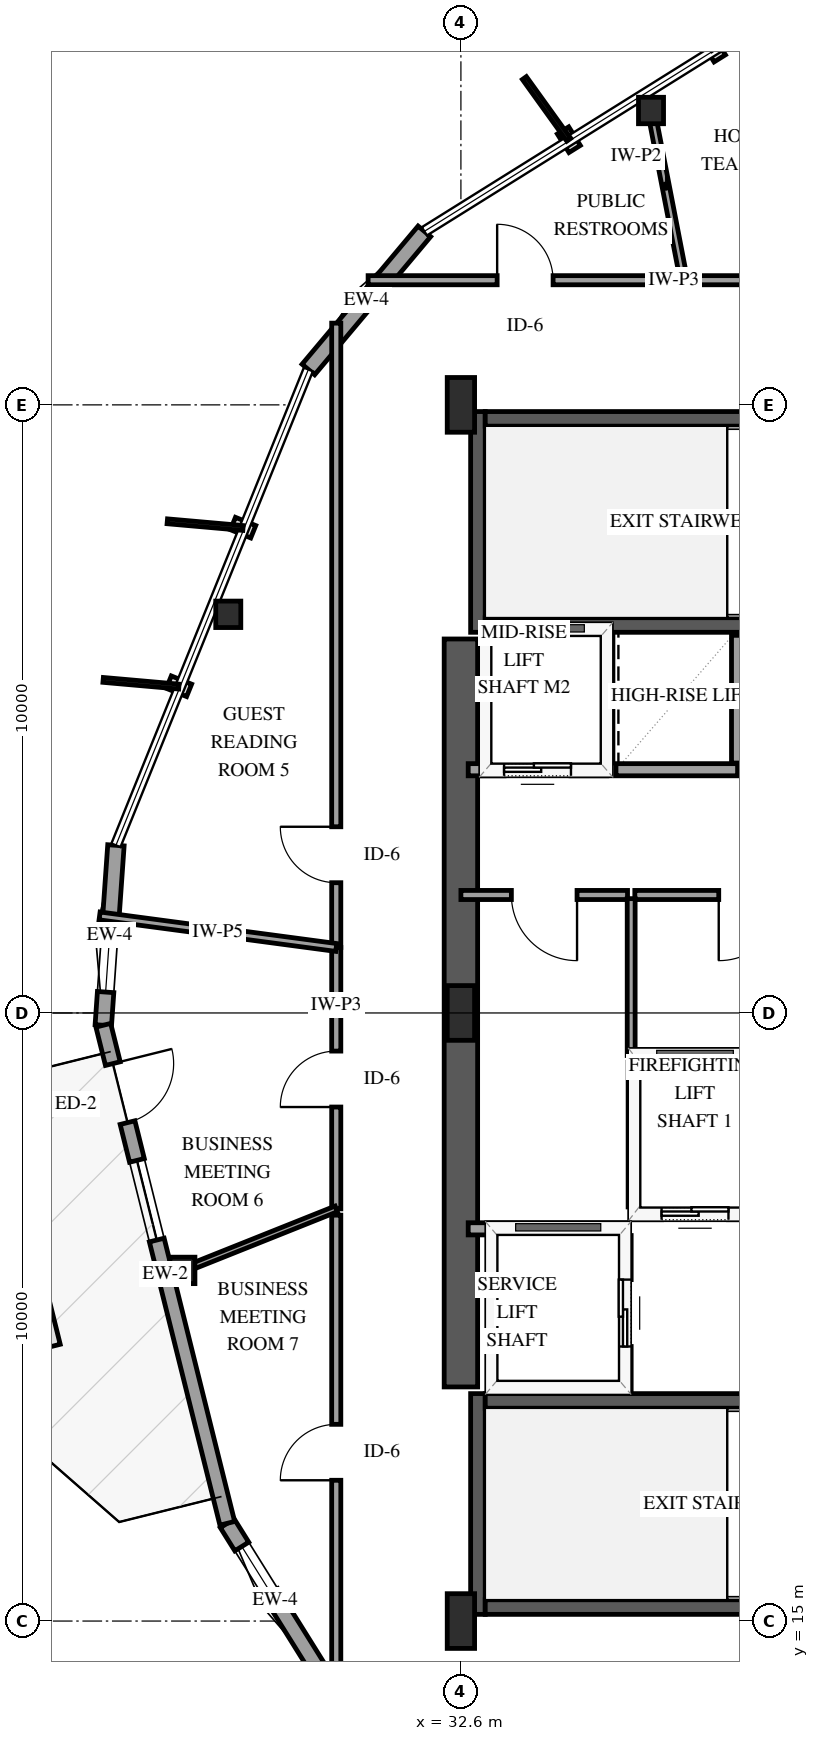
"""IFC4 building model, lengths in metres.
Left out: names, types, materials, properties, quantities, classifications, styles, units other than length and angle.
Written with IfcOpenShell. Run it as: python <this file> out.ifc"""

import sys

from ifc_helpers import new_model, si_unit, direction, frame, frame_2d, origin, origin_2d, place, context, subcontext, project, spatial, rectangle, i_section, extrude, element, fill, save


model = new_model("IFC4")
c1 = context("Model", 3, precision=1e-05, world=origin(), true_north=direction((0.0, 1.0)))
c2 = subcontext(c1, "Body", "Model", "MODEL_VIEW")
j1 = project(units=[si_unit("LENGTHUNIT", "METRE"), si_unit("PLANEANGLEUNIT", "RADIAN")], contexts=[c1])
p1 = place(None, origin())
s1 = spatial("IfcSite", under=j1, at=p1, CompositionType="ELEMENT")
p2 = place(p1, origin())
s2 = spatial("IfcBuilding", under=s1, at=p2, CompositionType="ELEMENT")
p3 = place(p2, frame((0.0, 0.0, 157.0)))
s3 = spatial("IfcBuildingStorey", under=s2, at=p3, CompositionType="ELEMENT", Elevation=157.0)
p4 = place(p3, frame((32.88, 15.11, 0.0), z_axis=(0.0, 0.0, 1.0), x_axis=(0.0, 1.0, 0.0)))
e1 = element("IfcWall", 1, at=p4, inside=s3, PredefinedType="SHEAR", context=c2, shape_type="SweptSolid", body=[
    extrude(rectangle(XDim=3.63, YDim=0.24, at=frame_2d((1.815, 0.0))), origin(), (0.0, 0.0, 1.0), 3.6),
])
for number, where, z_axis, x_axis in (
    (2, (33.0, 15.23, 0.0), (0.0, 0.0, 1.0), (1.0, 0.0, 0.0)),
    (3, (33.0, 18.62, 0.0), (0.0, 0.0, 1.0), (1.0, 0.0, 0.0)),
):
    element("IfcWall", number, at=place(p3, frame(where, z_axis=z_axis, x_axis=x_axis)), inside=s3, PredefinedType="SHEAR", context=c2, shape_type="SweptSolid", body=[
        extrude(rectangle(XDim=8.0, YDim=0.24, at=frame_2d((4.0, 0.0))), origin(), (0.0, 0.0, 1.0), 3.6),
    ])
p5 = place(p3, frame((32.88, 31.26, 0.0), z_axis=(0.0, 0.0, 1.0), x_axis=(0.0, 1.0, 0.0)))
e4 = element("IfcWall", 4, at=p5, inside=s3, PredefinedType="SHEAR", context=c2, shape_type="SweptSolid", body=[
    extrude(rectangle(XDim=3.63, YDim=0.24, at=frame_2d((1.815, 0.0))), origin(), (0.0, 0.0, 1.0), 3.6),
])
for number, where, z_axis, x_axis in (
    (5, (33.0, 31.38, 0.0), (0.0, 0.0, 1.0), (1.0, 0.0, 0.0)),
    (6, (33.0, 34.77, 0.0), (0.0, 0.0, 1.0), (1.0, 0.0, 0.0)),
):
    element("IfcWall", number, at=place(p3, frame(where, z_axis=z_axis, x_axis=x_axis)), inside=s3, PredefinedType="SHEAR", context=c2, shape_type="SweptSolid", body=[
        extrude(rectangle(XDim=8.0, YDim=0.24, at=frame_2d((4.0, 0.0))), origin(), (0.0, 0.0, 1.0), 3.6),
    ])
p6 = place(p3, frame((32.6, 18.85, 0.0), z_axis=(0.0, 0.0, 1.0), x_axis=(0.0, 1.0, 0.0)))
e7 = element("IfcWall", 7, at=p6, inside=s3, PredefinedType="SHEAR", context=c2, shape_type="SweptSolid", body=[
    extrude(rectangle(XDim=12.3, YDim=0.55, at=frame_2d((6.15, 0.0))), origin(), (0.0, 0.0, 1.0), 3.6),
])
for number, where, z_axis, x_axis in (
    (8, (32.6, 15.0, 0.0), (0.0, 0.0, 1.0), (1.0, 0.0, 0.0)),
    (9, (32.6, 25.0, 0.0), (0.0, 0.0, 1.0), (1.0, 0.0, 0.0)),
    (10, (32.6, 35.0, 0.0), (0.0, 0.0, 1.0), (1.0, 0.0, 0.0)),
):
    element("IfcColumn", number, at=place(p3, frame(where, z_axis=z_axis, x_axis=x_axis)), inside=s3, PredefinedType="PILASTER", context=c2, shape_type="SweptSolid", body=[
        extrude(rectangle(XDim=0.45, YDim=0.9, at=origin_2d()), origin(), (0.0, 0.0, 1.0), 3.6),
    ])
for number, where, z_axis, x_axis in (
    (11, (35.726, 39.841, 0.0), (0.0, 0.0, 1.0), (1.0, 0.0, 0.0)),
    (12, (28.774, 31.556, 0.0), (0.0, 0.0, 1.0), (1.0, 0.0, 0.0)),
    (13, (28.02, 20.766, 0.0), (0.0, 0.0, 1.0), (1.0, 0.0, 0.0)),
):
    element("IfcColumn", number, at=place(p3, frame(where, z_axis=z_axis, x_axis=x_axis)), inside=s3, PredefinedType="COLUMN", context=c2, shape_type="SweptSolid", body=[
        extrude(i_section(OverallWidth=0.412, OverallDepth=0.435, WebThickness=0.036, FlangeThickness=0.057, FilletRadius=0.038, at=origin_2d()), origin(), (0.0, 0.0, 1.0), 3.6),
    ])
p7 = place(p3, frame((31.999, 37.854, 0.0), z_axis=(0.0, 0.0, 1.0), x_axis=(-0.643085925087, -0.765794027762, 0.0)))
e14 = element("IfcWall", 14, at=p7, inside=s3, PredefinedType="SOLIDWALL", context=c2, shape_type="SweptSolid", body=[
    extrude(rectangle(XDim=2.967, YDim=0.27, at=frame_2d((1.483, 0.0))), origin(), (0.0, 0.0, 1.0), 2.679),
])
p8 = place(p3, frame((26.927, 27.757, 0.0), z_axis=(0.0, 0.0, 1.0), x_axis=(-0.070118221482, -0.997538688481, 0.0)))
e15 = element("IfcWall", 15, at=p8, inside=s3, PredefinedType="SOLIDWALL", context=c2, shape_type="SweptSolid", body=[
    extrude(rectangle(XDim=2.967, YDim=0.27, at=frame_2d((1.483, 0.0))), origin(), (0.0, 0.0, 1.0), 2.679),
])
p9 = place(p8, frame((1.519, 0.0, 0.75)))
e16 = element("IfcOpeningElement", 16, at=p9, cuts=e15, PredefinedType="OPENING", context=c2, shape_type="SweptSolid", body=[
    extrude(rectangle(XDim=0.9, YDim=1.5, at=frame_2d((0.45, 0.75))), frame((0.0, 0.145, 0.0), z_axis=(0.0, -1.0, 0.0), x_axis=(1.0, 0.0, 0.0)), (0.0, 0.0, 1.0), 0.29),
])
p10 = place(p3, frame((28.758, 16.607, 0.0), z_axis=(0.0, 0.0, 1.0), x_axis=(0.529592009117, -0.848252500073, 0.0)))
e17 = element("IfcWall", 17, at=p10, inside=s3, PredefinedType="SOLIDWALL", context=c2, shape_type="SweptSolid", body=[
    extrude(rectangle(XDim=2.967, YDim=0.27, at=frame_2d((1.483, 0.0))), origin(), (0.0, 0.0, 1.0), 2.679),
])
p11 = place(p10, frame((0.45, 0.0, 0.75)))
e18 = element("IfcOpeningElement", 18, at=p11, cuts=e17, PredefinedType="OPENING", context=c2, shape_type="SweptSolid", body=[
    extrude(rectangle(XDim=0.9, YDim=1.5, at=frame_2d((0.45, 0.75))), frame((0.0, 0.145, 0.0), z_axis=(0.0, -1.0, 0.0), x_axis=(1.0, 0.0, 0.0)), (0.0, 0.0, 1.0), 0.29),
])
p12 = place(p3, frame((26.719, 24.798, 0.0), z_axis=(0.0, 0.0, 1.0), x_axis=(0.241582680268, -0.970380239182, 0.0)))
e19 = element("IfcWall", 19, at=p12, inside=s3, PredefinedType="SOLIDWALL", context=c2, shape_type="SweptSolid", body=[
    extrude(rectangle(XDim=8.44, YDim=0.25, at=frame_2d((4.22, 0.0))), origin(), (0.0, 0.0, 1.0), 2.679),
])
p13 = place(p12, frame((0.65, 0.0, 0.0)))
e20 = element("IfcOpeningElement", 20, at=p13, cuts=e19, PredefinedType="OPENING", context=c2, shape_type="SweptSolid", body=[
    extrude(rectangle(XDim=1.0, YDim=2.15, at=frame_2d((0.5, 1.075))), frame((0.0, 0.135, 0.0), z_axis=(0.0, -1.0, 0.0), x_axis=(1.0, 0.0, 0.0)), (0.0, 0.0, 1.0), 0.27),
])
p14 = place(p12, frame((2.29, 0.0, 0.72)))
e21 = element("IfcOpeningElement", 21, at=p14, cuts=e19, PredefinedType="OPENING", context=c2, shape_type="SweptSolid", body=[
    extrude(rectangle(XDim=1.35, YDim=1.65, at=frame_2d((0.675, 0.825))), frame((0.0, 0.135, 0.0), z_axis=(0.0, -1.0, 0.0), x_axis=(1.0, 0.0, 0.0)), (0.0, 0.0, 1.0), 0.27),
])
p15 = place(p3, frame((35.45, 21.7, 0.0), z_axis=(0.0, 0.0, 1.0), x_axis=(1.0, 0.0, 0.0)))
e22 = element("IfcWall", 22, at=p15, inside=s3, PredefinedType="SOLIDWALL", context=c2, shape_type="SweptSolid", body=[
    extrude(rectangle(XDim=2.0, YDim=0.2, at=frame_2d((1.0, 0.0))), origin(), (0.0, 0.0, 1.0), 3.3),
])
p16 = place(p15, frame((0.45, 0.0, 0.0)))
e23 = element("IfcOpeningElement", 23, at=p16, cuts=e22, PredefinedType="OPENING", context=c2, shape_type="SweptSolid", body=[
    extrude(rectangle(XDim=1.1, YDim=2.15, at=frame_2d((0.55, 1.075))), frame((0.0, 0.11, 0.0), z_axis=(0.0, -1.0, 0.0), x_axis=(1.0, 0.0, 0.0)), (0.0, 0.0, 1.0), 0.22),
])
p17 = place(p3, frame((35.45, 24.3, 0.0), z_axis=(0.0, 0.0, 1.0), x_axis=(1.0, 0.0, 0.0)))
e24 = element("IfcWall", 24, at=p17, inside=s3, PredefinedType="SOLIDWALL", context=c2, shape_type="SweptSolid", body=[
    extrude(rectangle(XDim=2.0, YDim=0.2, at=frame_2d((1.0, 0.0))), origin(), (0.0, 0.0, 1.0), 3.3),
])
p18 = place(p3, frame((35.45, 21.81, 0.0), z_axis=(0.0, 0.0, 1.0), x_axis=(0.0, 1.0, 0.0)))
e25 = element("IfcWall", 25, at=p18, inside=s3, PredefinedType="SOLIDWALL", context=c2, shape_type="SweptSolid", body=[
    extrude(rectangle(XDim=2.38, YDim=0.2, at=frame_2d((1.19, 0.0))), origin(), (0.0, 0.0, 1.0), 3.3),
])
p19 = place(p3, frame((32.72, 21.45, 0.0), z_axis=(0.0, 0.0, 1.0), x_axis=(1.0, 0.0, 0.0)))
e26 = element("IfcWall", 26, at=p19, inside=s3, PredefinedType="SOLIDWALL", context=c2, shape_type="SweptSolid", body=[
    extrude(rectangle(XDim=2.58, YDim=0.2, at=frame_2d((1.29, 0.0))), origin(), (0.0, 0.0, 1.0), 3.3),
])
p20 = place(p3, frame((35.3, 18.79, 0.0), z_axis=(0.0, 0.0, 1.0), x_axis=(0.0, 1.0, 0.0)))
e27 = element("IfcWall", 27, at=p20, inside=s3, PredefinedType="SOLIDWALL", context=c2, shape_type="SweptSolid", body=[
    extrude(rectangle(XDim=2.55, YDim=0.2, at=frame_2d((1.275, 0.0))), origin(), (0.0, 0.0, 1.0), 3.3),
])
p21 = place(p20, frame((0.725, 0.0, 0.0)))
e28 = element("IfcOpeningElement", 28, at=p21, cuts=e27, PredefinedType="OPENING", context=c2, shape_type="SweptSolid", body=[
    extrude(rectangle(XDim=1.1, YDim=2.15, at=frame_2d((0.55, 1.075))), frame((0.0, 0.11, 0.0), z_axis=(0.0, -1.0, 0.0), x_axis=(1.0, 0.0, 0.0)), (0.0, 0.0, 1.0), 0.22),
])
p22 = place(p3, frame((32.72, 29.0, 0.0), z_axis=(0.0, 0.0, 1.0), x_axis=(1.0, 0.0, 0.0)))
e29 = element("IfcWall", 29, at=p22, inside=s3, PredefinedType="SOLIDWALL", context=c2, shape_type="SweptSolid", body=[
    extrude(rectangle(XDim=2.28, YDim=0.2, at=frame_2d((1.14, 0.0))), origin(), (0.0, 0.0, 1.0), 3.3),
])
p23 = place(p22, frame((0.59, 0.0, 0.0)))
e30 = element("IfcOpeningElement", 30, at=p23, cuts=e29, PredefinedType="OPENING", context=c2, shape_type="SweptSolid", body=[
    extrude(rectangle(XDim=1.1, YDim=2.15, at=frame_2d((0.55, 1.075))), frame((0.0, 0.11, 0.0), z_axis=(0.0, -1.0, 0.0), x_axis=(1.0, 0.0, 0.0)), (0.0, 0.0, 1.0), 0.22),
])
p24 = place(p3, frame((35.0, 29.11, 0.0), z_axis=(0.0, 0.0, 1.0), x_axis=(0.0, 1.0, 0.0)))
e31 = element("IfcWall", 31, at=p24, inside=s3, PredefinedType="SOLIDWALL", context=c2, shape_type="SweptSolid", body=[
    extrude(rectangle(XDim=2.1, YDim=0.2, at=frame_2d((1.05, 0.0))), origin(), (0.0, 0.0, 1.0), 3.3),
])
p25 = place(p3, frame((35.15, 29.0, 0.0), z_axis=(0.0, 0.0, 1.0), x_axis=(1.0, 0.0, 0.0)))
e32 = element("IfcWall", 32, at=p25, inside=s3, PredefinedType="SOLIDWALL", context=c2, shape_type="SweptSolid", body=[
    extrude(rectangle(XDim=2.0, YDim=0.2, at=frame_2d((1.0, 0.0))), origin(), (0.0, 0.0, 1.0), 3.3),
])
p26 = place(p3, frame((37.15, 29.11, 0.0), z_axis=(0.0, 0.0, 1.0), x_axis=(0.0, 1.0, 0.0)))
e33 = element("IfcWall", 33, at=p26, inside=s3, PredefinedType="SOLIDWALL", context=c2, shape_type="SweptSolid", body=[
    extrude(rectangle(XDim=2.1, YDim=0.2, at=frame_2d((1.05, 0.0))), origin(), (0.0, 0.0, 1.0), 3.3),
])
p27 = place(p3, frame((30.55, 26.077, 0.0), z_axis=(0.0, 0.0, 1.0), x_axis=(0.0, 1.0, 0.0)))
e34 = element("IfcWall", 34, at=p27, inside=s3, PredefinedType="PARTITIONING", context=c2, shape_type="SweptSolid", body=[
    extrude(rectangle(XDim=10.267, YDim=0.15, at=frame_2d((5.134, 0.0))), origin(), (0.0, 0.0, 1.0), 3.3),
])
p28 = place(p27, frame((1.065, 0.0, 0.0)))
e35 = element("IfcOpeningElement", 35, at=p28, cuts=e34, PredefinedType="OPENING", context=c2, shape_type="SweptSolid", body=[
    extrude(rectangle(XDim=0.92, YDim=2.12, at=frame_2d((0.46, 1.06))), frame((0.0, 0.085, 0.0), z_axis=(0.0, -1.0, 0.0), x_axis=(1.0, 0.0, 0.0)), (0.0, 0.0, 1.0), 0.17),
])
p29 = place(p3, frame((30.55, 13.906, 0.0), z_axis=(0.0, 0.0, 1.0), x_axis=(0.0, 1.0, 0.0)))
e36 = element("IfcWall", 36, at=p29, inside=s3, PredefinedType="PARTITIONING", context=c2, shape_type="SweptSolid", body=[
    extrude(rectangle(XDim=7.769, YDim=0.15, at=frame_2d((3.885, 0.0))), origin(), (0.0, 0.0, 1.0), 3.3),
])
p30 = place(p29, frame((3.409, 0.0, 0.0)))
e37 = element("IfcOpeningElement", 37, at=p30, cuts=e36, PredefinedType="OPENING", context=c2, shape_type="SweptSolid", body=[
    extrude(rectangle(XDim=0.92, YDim=2.12, at=frame_2d((0.46, 1.06))), frame((0.0, 0.085, 0.0), z_axis=(0.0, -1.0, 0.0), x_axis=(1.0, 0.0, 0.0)), (0.0, 0.0, 1.0), 0.17),
])
p31 = place(p3, frame((31.074, 37.05, 0.0), z_axis=(0.0, 0.0, 1.0), x_axis=(1.0, 0.0, 0.0)))
e38 = element("IfcWall", 38, at=p31, inside=s3, PredefinedType="PARTITIONING", context=c2, shape_type="SweptSolid", body=[
    extrude(rectangle(XDim=5.193, YDim=0.15, at=frame_2d((2.597, 0.0))), origin(), (0.0, 0.0, 1.0), 3.3),
])
p32 = place(p31, frame((2.122, 0.0, 0.0)))
e39 = element("IfcOpeningElement", 39, at=p32, cuts=e38, PredefinedType="OPENING", context=c2, shape_type="SweptSolid", body=[
    extrude(rectangle(XDim=0.92, YDim=2.12, at=frame_2d((0.46, 1.06))), frame((0.0, 0.085, 0.0), z_axis=(0.0, -1.0, 0.0), x_axis=(1.0, 0.0, 0.0)), (0.0, 0.0, 1.0), 0.17),
])
p33 = place(p3, frame((36.267, 37.05, 0.0), z_axis=(0.0, 0.0, 1.0), x_axis=(1.0, 0.0, 0.0)))
e40 = element("IfcWall", 40, at=p33, inside=s3, PredefinedType="PARTITIONING", context=c2, shape_type="SweptSolid", body=[
    extrude(rectangle(XDim=4.863, YDim=0.15, at=frame_2d((2.431, 0.0))), origin(), (0.0, 0.0, 1.0), 3.3),
])
p34 = place(p3, frame((30.55, 21.778, 0.0), z_axis=(0.0, 0.0, 1.0), x_axis=(0.0, 1.0, 0.0)))
e41 = element("IfcWall", 41, at=p34, inside=s3, PredefinedType="PARTITIONING", context=c2, shape_type="SweptSolid", body=[
    extrude(rectangle(XDim=4.299, YDim=0.15, at=frame_2d((2.149, 0.0))), origin(), (0.0, 0.0, 1.0), 3.3),
])
p35 = place(p34, frame((1.675, 0.0, 0.0)))
e42 = element("IfcOpeningElement", 42, at=p35, cuts=e41, PredefinedType="OPENING", context=c2, shape_type="SweptSolid", body=[
    extrude(rectangle(XDim=0.92, YDim=2.12, at=frame_2d((0.46, 1.06))), frame((0.0, 0.085, 0.0), z_axis=(0.0, -1.0, 0.0), x_axis=(1.0, 0.0, 0.0)), (0.0, 0.0, 1.0), 0.17),
])
p36 = place(p3, frame((30.55, 26.077, 0.0), z_axis=(0.0, 0.0, 1.0), x_axis=(-0.991224642202, 0.132188156399, 0.0)))
e43 = element("IfcWall", 43, at=p36, inside=s3, PredefinedType="PARTITIONING", context=c2, shape_type="SweptSolid", body=[
    extrude(rectangle(XDim=3.927, YDim=0.13, at=frame_2d((1.963, 0.0))), origin(), (0.0, 0.0, 1.0), 3.3),
])
p37 = place(p3, frame((39.3, 26.94, 0.0), z_axis=(0.0, 0.0, 1.0), x_axis=(-1.0, 0.0, 0.0)))
e44 = element("IfcWall", 44, at=p37, inside=s3, PredefinedType="PARTITIONING", context=c2, shape_type="SweptSolid", body=[
    extrude(rectangle(XDim=3.84, YDim=0.15, at=frame_2d((1.92, 0.0))), origin(), (0.0, 0.0, 1.0), 3.3),
])
p38 = place(p37, frame((1.38, 0.0, 0.0)))
e45 = element("IfcOpeningElement", 45, at=p38, cuts=e44, PredefinedType="OPENING", context=c2, shape_type="SweptSolid", body=[
    extrude(rectangle(XDim=1.08, YDim=2.15, at=frame_2d((0.54, 1.075))), frame((0.0, 0.085, 0.0), z_axis=(0.0, -1.0, 0.0), x_axis=(1.0, 0.0, 0.0)), (0.0, 0.0, 1.0), 0.17),
])
p39 = place(p3, frame((36.267, 37.05, 0.0), z_axis=(0.0, 0.0, 1.0), x_axis=(-0.190108621236, 0.981763063133, 0.0)))
e46 = element("IfcWall", 46, at=p39, inside=s3, PredefinedType="PARTITIONING", context=c2, shape_type="SweptSolid", body=[
    extrude(rectangle(XDim=3.151, YDim=0.12, at=frame_2d((1.576, 0.0))), origin(), (0.0, 0.0, 1.0), 2.595),
])
p40 = place(p3, frame((30.55, 21.778, 0.0), z_axis=(0.0, 0.0, 1.0), x_axis=(-0.928621753336, -0.371027814634, 0.0)))
e47 = element("IfcWall", 47, at=p40, inside=s3, PredefinedType="PARTITIONING", context=c2, shape_type="SweptSolid", body=[
    extrude(rectangle(XDim=3.016, YDim=0.1, at=frame_2d((1.508, 0.0))), origin(), (0.0, 0.0, 1.0), 3.3),
])
p41 = place(p3, frame((35.34, 26.94, 0.0), z_axis=(0.0, 0.0, 1.0), x_axis=(-1.0, 0.0, 0.0)))
e48 = element("IfcWall", 48, at=p41, inside=s3, PredefinedType="PARTITIONING", context=c2, shape_type="SweptSolid", body=[
    extrude(rectangle(XDim=2.74, YDim=0.15, at=frame_2d((1.37, 0.0))), origin(), (0.0, 0.0, 1.0), 3.3),
])
p42 = place(p41, frame((0.83, 0.0, 0.0)))
e49 = element("IfcOpeningElement", 49, at=p42, cuts=e48, PredefinedType="OPENING", context=c2, shape_type="SweptSolid", body=[
    extrude(rectangle(XDim=1.08, YDim=2.15, at=frame_2d((0.54, 1.075))), frame((0.0, 0.085, 0.0), z_axis=(0.0, -1.0, 0.0), x_axis=(1.0, 0.0, 0.0)), (0.0, 0.0, 1.0), 0.17),
])
p43 = place(p3, frame((35.4, 26.88, 0.0), z_axis=(0.0, 0.0, 1.0), x_axis=(0.0, -1.0, 0.0)))
e50 = element("IfcWall", 50, at=p43, inside=s3, PredefinedType="PARTITIONING", context=c2, shape_type="SweptSolid", body=[
    extrude(rectangle(XDim=2.58, YDim=0.13, at=frame_2d((1.29, 0.0))), origin(), (0.0, 0.0, 1.0), 3.3),
])
p44 = place(p9, origin())
e51 = element("IfcWindow", 51, at=p44, inside=s3, PartitioningType="SINGLE_PANEL", PredefinedType="WINDOW", context=c2, shape_type="SweptSolid", body=[
    extrude(rectangle(XDim=0.9, YDim=1.5, at=frame_2d((0.45, 0.75))), frame((0.0, 0.03, 0.0), z_axis=(0.0, -1.0, 0.0), x_axis=(1.0, 0.0, 0.0)), (0.0, 0.0, 1.0), 0.06),
])
fill(e16, e51)
p45 = place(p11, origin())
e52 = element("IfcWindow", 52, at=p45, inside=s3, PartitioningType="SINGLE_PANEL", PredefinedType="WINDOW", context=c2, shape_type="SweptSolid", body=[
    extrude(rectangle(XDim=0.9, YDim=1.5, at=frame_2d((0.45, 0.75))), frame((0.0, 0.03, 0.0), z_axis=(0.0, -1.0, 0.0), x_axis=(1.0, 0.0, 0.0)), (0.0, 0.0, 1.0), 0.06),
])
fill(e18, e52)
p46 = place(p13, origin())
e53 = element("IfcDoor", 53, at=p46, inside=s3, OperationType="SINGLE_SWING_LEFT", PredefinedType="DOOR", context=c2, shape_type="SweptSolid", body=[
    extrude(rectangle(XDim=1.0, YDim=2.15, at=frame_2d((0.5, 1.075))), frame((0.0, 0.025, 0.0), z_axis=(0.0, -1.0, 0.0), x_axis=(1.0, 0.0, 0.0)), (0.0, 0.0, 1.0), 0.05),
])
fill(e20, e53)
p47 = place(p14, origin())
e54 = element("IfcWindow", 54, at=p47, inside=s3, PartitioningType="SINGLE_PANEL", PredefinedType="WINDOW", context=c2, shape_type="SweptSolid", body=[
    extrude(rectangle(XDim=1.35, YDim=1.65, at=frame_2d((0.675, 0.825))), frame((0.0, 0.03, 0.0), z_axis=(0.0, -1.0, 0.0), x_axis=(1.0, 0.0, 0.0)), (0.0, 0.0, 1.0), 0.06),
])
fill(e21, e54)
p48 = place(p16, origin())
e55 = element("IfcDoor", 55, at=p48, inside=s3, OperationType="SLIDING_TO_LEFT", PredefinedType="DOOR", context=c2, shape_type="SweptSolid", body=[
    extrude(rectangle(XDim=1.1, YDim=2.15, at=frame_2d((0.55, 1.075))), frame((0.0, 0.025, 0.0), z_axis=(0.0, -1.0, 0.0), x_axis=(1.0, 0.0, 0.0)), (0.0, 0.0, 1.0), 0.05),
])
fill(e23, e55)
p49 = place(p21, origin())
e56 = element("IfcDoor", 56, at=p49, inside=s3, OperationType="SLIDING_TO_LEFT", PredefinedType="DOOR", context=c2, shape_type="SweptSolid", body=[
    extrude(rectangle(XDim=1.1, YDim=2.15, at=frame_2d((0.55, 1.075))), frame((0.0, 0.025, 0.0), z_axis=(0.0, -1.0, 0.0), x_axis=(1.0, 0.0, 0.0)), (0.0, 0.0, 1.0), 0.05),
])
fill(e28, e56)
p50 = place(p23, origin())
e57 = element("IfcDoor", 57, at=p50, inside=s3, OperationType="SLIDING_TO_LEFT", PredefinedType="DOOR", context=c2, shape_type="SweptSolid", body=[
    extrude(rectangle(XDim=1.1, YDim=2.15, at=frame_2d((0.55, 1.075))), frame((0.0, 0.025, 0.0), z_axis=(0.0, -1.0, 0.0), x_axis=(1.0, 0.0, 0.0)), (0.0, 0.0, 1.0), 0.05),
])
fill(e30, e57)
p51 = place(p28, origin())
e58 = element("IfcDoor", 58, at=p51, inside=s3, OperationType="SINGLE_SWING_RIGHT", PredefinedType="DOOR", context=c2, shape_type="SweptSolid", body=[
    extrude(rectangle(XDim=0.92, YDim=2.12, at=frame_2d((0.46, 1.06))), frame((0.0, 0.025, 0.0), z_axis=(0.0, -1.0, 0.0), x_axis=(1.0, 0.0, 0.0)), (0.0, 0.0, 1.0), 0.05),
])
fill(e35, e58)
p52 = place(p30, origin())
e59 = element("IfcDoor", 59, at=p52, inside=s3, OperationType="SINGLE_SWING_LEFT", PredefinedType="DOOR", context=c2, shape_type="SweptSolid", body=[
    extrude(rectangle(XDim=0.92, YDim=2.12, at=frame_2d((0.46, 1.06))), frame((0.0, 0.025, 0.0), z_axis=(0.0, -1.0, 0.0), x_axis=(1.0, 0.0, 0.0)), (0.0, 0.0, 1.0), 0.05),
])
fill(e37, e59)
p53 = place(p32, origin())
e60 = element("IfcDoor", 60, at=p53, inside=s3, OperationType="SINGLE_SWING_LEFT", PredefinedType="DOOR", context=c2, shape_type="SweptSolid", body=[
    extrude(rectangle(XDim=0.92, YDim=2.12, at=frame_2d((0.46, 1.06))), frame((0.0, 0.025, 0.0), z_axis=(0.0, -1.0, 0.0), x_axis=(1.0, 0.0, 0.0)), (0.0, 0.0, 1.0), 0.05),
])
fill(e39, e60)
p54 = place(p35, origin())
e61 = element("IfcDoor", 61, at=p54, inside=s3, OperationType="SINGLE_SWING_LEFT", PredefinedType="DOOR", context=c2, shape_type="SweptSolid", body=[
    extrude(rectangle(XDim=0.92, YDim=2.12, at=frame_2d((0.46, 1.06))), frame((0.0, 0.025, 0.0), z_axis=(0.0, -1.0, 0.0), x_axis=(1.0, 0.0, 0.0)), (0.0, 0.0, 1.0), 0.05),
])
fill(e42, e61)
p55 = place(p38, origin())
e62 = element("IfcDoor", 62, at=p55, inside=s3, OperationType="SINGLE_SWING_RIGHT", PredefinedType="DOOR", context=c2, shape_type="SweptSolid", body=[
    extrude(rectangle(XDim=1.08, YDim=2.15, at=frame_2d((0.54, 1.075))), frame((0.0, 0.025, 0.0), z_axis=(0.0, -1.0, 0.0), x_axis=(1.0, 0.0, 0.0)), (0.0, 0.0, 1.0), 0.05),
])
fill(e45, e62)
p56 = place(p42, origin())
e63 = element("IfcDoor", 63, at=p56, inside=s3, OperationType="SINGLE_SWING_LEFT", PredefinedType="DOOR", context=c2, shape_type="SweptSolid", body=[
    extrude(rectangle(XDim=1.08, YDim=2.15, at=frame_2d((0.54, 1.075))), frame((0.0, 0.025, 0.0), z_axis=(0.0, -1.0, 0.0), x_axis=(1.0, 0.0, 0.0)), (0.0, 0.0, 1.0), 0.05),
])
fill(e49, e63)
save(model, sys.argv[1])
